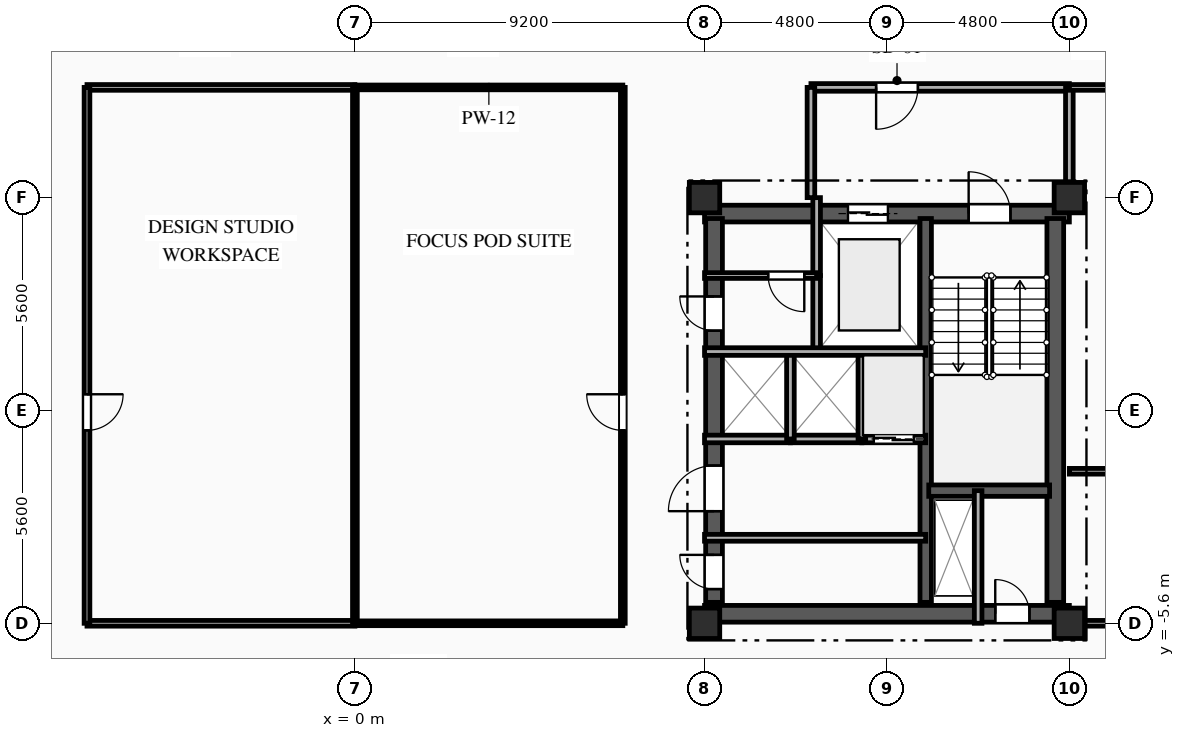
"""IFC4 building model, lengths in metres.
Left out: names, types, materials, properties, quantities, classifications, styles, units other than length and angle.
Written with IfcOpenShell. Run it as: python <this file> out.ifc"""

import sys

from ifc_helpers import new_model, si_unit, direction, frame, frame_2d, origin, origin_2d, place, context, subcontext, project, spatial, rectangle, extrude, element, fill, save


model = new_model("IFC4")
c1 = context("Model", 3, precision=1e-05, world=origin(), true_north=direction((0.0, 1.0)))
c2 = subcontext(c1, "Body", "Model", "MODEL_VIEW")
j1 = project(units=[si_unit("LENGTHUNIT", "METRE"), si_unit("PLANEANGLEUNIT", "RADIAN")], contexts=[c1])
p1 = place(None, origin())
s1 = spatial("IfcSite", under=j1, at=p1, CompositionType="ELEMENT")
p2 = place(p1, origin())
s2 = spatial("IfcBuilding", under=s1, at=p2, CompositionType="ELEMENT")
p3 = place(p2, frame((0.0, 0.0, 238.35)))
s3 = spatial("IfcBuildingStorey", under=s2, at=p3, CompositionType="ELEMENT", Elevation=238.35)
for number, where, z_axis, x_axis in (
    (1, (9.2, -5.6, 0.0), (0.0, 0.0, 1.0), (1.0, 0.0, 0.0)),
    (2, (9.2, 5.6, 0.0), (0.0, 0.0, 1.0), (1.0, 0.0, 0.0)),
    (3, (18.8, -5.6, 0.0), (0.0, 0.0, 1.0), (1.0, 0.0, 0.0)),
    (4, (18.8, 5.6, 0.0), (0.0, 0.0, 1.0), (1.0, 0.0, 0.0)),
):
    element("IfcColumn", number, at=place(p3, frame(where, z_axis=z_axis, x_axis=x_axis)), inside=s3, PredefinedType="COLUMN", context=c2, shape_type="SweptSolid", body=[
        extrude(rectangle(XDim=0.8, YDim=0.8, at=origin_2d()), origin(), (0.0, 0.0, 1.0), 3.35),
    ])
p4 = place(p3, frame((9.2, 5.18, 0.0), z_axis=(0.0, 0.0, 1.0), x_axis=(1.0, 0.0, 0.0)))
e5 = element("IfcWall", 5, at=p4, inside=s3, PredefinedType="SHEAR", context=c2, shape_type="SweptSolid", body=[
    extrude(rectangle(XDim=9.6, YDim=0.44, at=frame_2d((4.8, 0.0))), origin(), (0.0, 0.0, 1.0), 3.04),
])
p5 = place(p4, frame((6.95, 0.0, 0.0)))
e6 = element("IfcOpeningElement", 6, at=p5, cuts=e5, PredefinedType="OPENING", context=c2, shape_type="SweptSolid", body=[
    extrude(rectangle(XDim=1.1, YDim=2.15, at=frame_2d((0.55, 1.075))), frame((0.0, 0.23, 0.0), z_axis=(0.0, -1.0, 0.0), x_axis=(1.0, 0.0, 0.0)), (0.0, 0.0, 1.0), 0.46),
])
p6 = place(p4, frame((3.775, 0.0, 0.0)))
e7 = element("IfcOpeningElement", 7, at=p6, cuts=e5, PredefinedType="OPENING", context=c2, shape_type="SweptSolid", body=[
    extrude(rectangle(XDim=1.05, YDim=2.1, at=frame_2d((0.525, 1.05))), frame((0.0, 0.23, 0.0), z_axis=(0.0, -1.0, 0.0), x_axis=(1.0, 0.0, 0.0)), (0.0, 0.0, 1.0), 0.46),
])
p7 = place(p3, frame((9.2, -5.35, 0.0), z_axis=(0.0, 0.0, 1.0), x_axis=(1.0, 0.0, 0.0)))
e8 = element("IfcWall", 8, at=p7, inside=s3, PredefinedType="SHEAR", context=c2, shape_type="SweptSolid", body=[
    extrude(rectangle(XDim=9.6, YDim=0.44, at=frame_2d((4.8, 0.0))), origin(), (0.0, 0.0, 1.0), 3.04),
])
p8 = place(p7, frame((7.65, 0.0, 0.0)))
e9 = element("IfcOpeningElement", 9, at=p8, cuts=e8, PredefinedType="OPENING", context=c2, shape_type="SweptSolid", body=[
    extrude(rectangle(XDim=0.9, YDim=2.1, at=frame_2d((0.45, 1.05))), frame((0.0, 0.23, 0.0), z_axis=(0.0, -1.0, 0.0), x_axis=(1.0, 0.0, 0.0)), (0.0, 0.0, 1.0), 0.46),
])
p9 = place(p3, frame((9.45, -5.05, 0.0), z_axis=(0.0, 0.0, 1.0), x_axis=(0.0, 1.0, 0.0)))
e10 = element("IfcWall", 10, at=p9, inside=s3, PredefinedType="SHEAR", context=c2, shape_type="SweptSolid", body=[
    extrude(rectangle(XDim=10.1, YDim=0.44, at=frame_2d((5.05, 0.0))), origin(), (0.0, 0.0, 1.0), 3.04),
])
p10 = place(p9, frame((7.15, 0.0, 0.0)))
e11 = element("IfcOpeningElement", 11, at=p10, cuts=e10, PredefinedType="OPENING", context=c2, shape_type="SweptSolid", body=[
    extrude(rectangle(XDim=0.9, YDim=2.1, at=frame_2d((0.45, 1.05))), frame((0.0, 0.23, 0.0), z_axis=(0.0, -1.0, 0.0), x_axis=(1.0, 0.0, 0.0)), (0.0, 0.0, 1.0), 0.46),
])
p11 = place(p9, frame((2.4, 0.0, 0.0)))
e12 = element("IfcOpeningElement", 12, at=p11, cuts=e10, PredefinedType="OPENING", context=c2, shape_type="SweptSolid", body=[
    extrude(rectangle(XDim=1.2, YDim=2.15, at=frame_2d((0.6, 1.075))), frame((0.0, 0.23, 0.0), z_axis=(0.0, -1.0, 0.0), x_axis=(1.0, 0.0, 0.0)), (0.0, 0.0, 1.0), 0.46),
])
p12 = place(p9, frame((0.35, 0.0, 0.0)))
e13 = element("IfcOpeningElement", 13, at=p12, cuts=e10, PredefinedType="OPENING", context=c2, shape_type="SweptSolid", body=[
    extrude(rectangle(XDim=0.9, YDim=2.1, at=frame_2d((0.45, 1.05))), frame((0.0, 0.23, 0.0), z_axis=(0.0, -1.0, 0.0), x_axis=(1.0, 0.0, 0.0)), (0.0, 0.0, 1.0), 0.46),
])
p13 = place(p3, frame((18.43, -5.05, 0.0), z_axis=(0.0, 0.0, 1.0), x_axis=(0.0, 1.0, 0.0)))
e14 = element("IfcWall", 14, at=p13, inside=s3, PredefinedType="SHEAR", context=c2, shape_type="SweptSolid", body=[
    extrude(rectangle(XDim=10.1, YDim=0.44, at=frame_2d((5.05, 0.0))), origin(), (0.0, 0.0, 1.0), 3.04),
])
p14 = place(p3, frame((15.02, -5.05, 0.0), z_axis=(0.0, 0.0, 1.0), x_axis=(0.0, 1.0, 0.0)))
e15 = element("IfcWall", 15, at=p14, inside=s3, PredefinedType="SHEAR", context=c2, shape_type="SweptSolid", body=[
    extrude(rectangle(XDim=10.1, YDim=0.3, at=frame_2d((5.05, 0.0))), origin(), (0.0, 0.0, 1.0), 3.04),
])
p15 = place(p3, frame((15.1, -2.11, 0.0), z_axis=(0.0, 0.0, 1.0), x_axis=(1.0, 0.0, 0.0)))
e16 = element("IfcWall", 16, at=p15, inside=s3, PredefinedType="SHEAR", context=c2, shape_type="SweptSolid", body=[
    extrude(rectangle(XDim=3.18, YDim=0.3, at=frame_2d((1.59, 0.0))), origin(), (0.0, 0.0, 1.0), 3.04),
])
p16 = place(p3, frame((16.4, -2.11, 0.0), z_axis=(0.0, 0.0, 1.0), x_axis=(0.0, -1.0, 0.0)))
e17 = element("IfcWall", 17, at=p16, inside=s3, PredefinedType="PARTITIONING", context=c2, shape_type="SweptSolid", body=[
    extrude(rectangle(XDim=3.49, YDim=0.2, at=frame_2d((1.745, 0.0))), origin(), (0.0, 0.0, 1.0), 3.04),
])
p17 = place(p3, frame((12.15, 3.55, 0.0), z_axis=(0.0, 0.0, 1.0), x_axis=(0.0, -1.0, 0.0)))
e18 = element("IfcWall", 18, at=p17, inside=s3, PredefinedType="PARTITIONING", context=c2, shape_type="SweptSolid", body=[
    extrude(rectangle(XDim=2.0, YDim=0.2, at=frame_2d((1.0, 0.0))), origin(), (0.0, 0.0, 1.0), 3.04),
])
p18 = place(p3, frame((12.15, 5.6, 0.0), z_axis=(0.0, 0.0, 1.0), x_axis=(0.0, -1.0, 0.0)))
e19 = element("IfcWall", 19, at=p18, inside=s3, PredefinedType="PARTITIONING", context=c2, shape_type="SweptSolid", body=[
    extrude(rectangle(XDim=2.05, YDim=0.2, at=frame_2d((1.025, 0.0))), origin(), (0.0, 0.0, 1.0), 3.04),
])
p19 = place(p3, frame((18.8, 8.5, 0.0), z_axis=(0.0, 0.0, 1.0), x_axis=(-1.0, 0.0, 0.0)))
e20 = element("IfcWall", 20, at=p19, inside=s3, PredefinedType="PARTITIONING", context=c2, shape_type="SweptSolid", body=[
    extrude(rectangle(XDim=6.8, YDim=0.2, at=frame_2d((3.4, 0.0))), origin(), (0.0, 0.0, 1.0), 3.04),
])
p20 = place(p19, frame((3.985, 0.0, 0.0)))
e21 = element("IfcOpeningElement", 21, at=p20, cuts=e20, PredefinedType="OPENING", context=c2, shape_type="SweptSolid", body=[
    extrude(rectangle(XDim=1.1, YDim=2.15, at=frame_2d((0.55, 1.075))), frame((0.0, 0.11, 0.0), z_axis=(0.0, -1.0, 0.0), x_axis=(1.0, 0.0, 0.0)), (0.0, 0.0, 1.0), 0.22),
])
p21 = place(p3, frame((12.0, 8.5, 0.0), z_axis=(0.0, 0.0, 1.0), x_axis=(0.0, -1.0, 0.0)))
e22 = element("IfcWall", 22, at=p21, inside=s3, PredefinedType="PARTITIONING", context=c2, shape_type="SweptSolid", body=[
    extrude(rectangle(XDim=2.9, YDim=0.2, at=frame_2d((1.45, 0.0))), origin(), (0.0, 0.0, 1.0), 3.04),
])
p22 = place(p3, frame((18.8, 5.6, 0.0), z_axis=(0.0, 0.0, 1.0), x_axis=(0.0, 1.0, 0.0)))
e23 = element("IfcWall", 23, at=p22, inside=s3, PredefinedType="PARTITIONING", context=c2, shape_type="SweptSolid", body=[
    extrude(rectangle(XDim=2.9, YDim=0.2, at=frame_2d((1.45, 0.0))), origin(), (0.0, 0.0, 1.0), 2.665),
])
p23 = place(p3, frame((12.15, 3.55, 0.0), z_axis=(0.0, 0.0, 1.0), x_axis=(-1.0, 0.0, 0.0)))
e24 = element("IfcWall", 24, at=p23, inside=s3, PredefinedType="PARTITIONING", context=c2, shape_type="SweptSolid", body=[
    extrude(rectangle(XDim=2.95, YDim=0.15, at=frame_2d((1.475, 0.0))), origin(), (0.0, 0.0, 1.0), 3.04),
])
p24 = place(p23, frame((0.325, 0.0, 0.0)))
e25 = element("IfcOpeningElement", 25, at=p24, cuts=e24, PredefinedType="OPENING", context=c2, shape_type="SweptSolid", body=[
    extrude(rectangle(XDim=0.95, YDim=2.1, at=frame_2d((0.475, 1.05))), frame((0.0, 0.085, 0.0), z_axis=(0.0, -1.0, 0.0), x_axis=(1.0, 0.0, 0.0)), (0.0, 0.0, 1.0), 0.17),
])
p25 = place(p3, frame((9.2, -3.35, 0.0), z_axis=(0.0, 0.0, 1.0), x_axis=(1.0, 0.0, 0.0)))
e26 = element("IfcWall", 26, at=p25, inside=s3, PredefinedType="PARTITIONING", context=c2, shape_type="SweptSolid", body=[
    extrude(rectangle(XDim=5.82, YDim=0.18, at=frame_2d((2.91, 0.0))), origin(), (0.0, 0.0, 1.0), 2.755),
])
p26 = place(p3, frame((11.46, -0.75, 0.0), z_axis=(0.0, 0.0, 1.0), x_axis=(-1.0, 0.0, 0.0)))
e27 = element("IfcWall", 27, at=p26, inside=s3, PredefinedType="PARTITIONING", context=c2, shape_type="SweptSolid", body=[
    extrude(rectangle(XDim=2.26, YDim=0.2, at=frame_2d((1.13, 0.0))), origin(), (0.0, 0.0, 1.0), 3.04),
])
p27 = place(p3, frame((13.34, -0.75, 0.0), z_axis=(0.0, 0.0, 1.0), x_axis=(-1.0, 0.0, 0.0)))
e28 = element("IfcWall", 28, at=p27, inside=s3, PredefinedType="PARTITIONING", context=c2, shape_type="SweptSolid", body=[
    extrude(rectangle(XDim=1.88, YDim=0.2, at=frame_2d((0.94, 0.0))), origin(), (0.0, 0.0, 1.0), 3.04),
])
p28 = place(p3, frame((15.02, -0.75, 0.0), z_axis=(0.0, 0.0, 1.0), x_axis=(-1.0, 0.0, 0.0)))
e29 = element("IfcWall", 29, at=p28, inside=s3, PredefinedType="PARTITIONING", context=c2, shape_type="SweptSolid", body=[
    extrude(rectangle(XDim=1.68, YDim=0.2, at=frame_2d((0.84, 0.0))), origin(), (0.0, 0.0, 1.0), 3.04),
])
p29 = place(p28, frame((0.315, 0.0, 0.0)))
e30 = element("IfcOpeningElement", 30, at=p29, cuts=e29, PredefinedType="OPENING", context=c2, shape_type="SweptSolid", body=[
    extrude(rectangle(XDim=1.05, YDim=2.1, at=frame_2d((0.525, 1.05))), frame((0.0, 0.11, 0.0), z_axis=(0.0, -1.0, 0.0), x_axis=(1.0, 0.0, 0.0)), (0.0, 0.0, 1.0), 0.22),
])
for number, where, z_axis, x_axis in (
    (31, (11.46, -0.75, 0.0), (0.0, 0.0, 1.0), (0.0, 1.0, 0.0)),
    (32, (13.34, -0.75, 0.0), (0.0, 0.0, 1.0), (0.0, 1.0, 0.0)),
):
    element("IfcWall", number, at=place(p3, frame(where, z_axis=z_axis, x_axis=x_axis)), inside=s3, PredefinedType="PARTITIONING", context=c2, shape_type="SweptSolid", body=[
        extrude(rectangle(XDim=2.3, YDim=0.2, at=frame_2d((1.15, 0.0))), origin(), (0.0, 0.0, 1.0), 3.04),
    ])
p30 = place(p3, frame((0.0, 8.5, 0.0), z_axis=(0.0, 0.0, 1.0), x_axis=(-1.0, 0.0, 0.0)))
e33 = element("IfcWall", 33, at=p30, inside=s3, PredefinedType="PARTITIONING", context=c2, shape_type="SweptSolid", body=[
    extrude(rectangle(XDim=7.05, YDim=0.15, at=frame_2d((3.525, 0.0))), origin(), (0.0, 0.0, 1.0), 3.04),
])
p31 = place(p3, frame((20.5, 8.5, 0.0), z_axis=(0.0, 0.0, 1.0), x_axis=(-1.0, 0.0, 0.0)))
e34 = element("IfcWall", 34, at=p31, inside=s3, PredefinedType="PARTITIONING", context=c2, shape_type="SweptSolid", body=[
    extrude(rectangle(XDim=1.7, YDim=0.15, at=frame_2d((0.85, 0.0))), origin(), (0.0, 0.0, 1.0), 3.04),
])
p32 = place(p3, frame((7.05, 8.5, 0.0), z_axis=(0.0, 0.0, 1.0), x_axis=(-1.0, 0.0, 0.0)))
e35 = element("IfcWall", 35, at=p32, inside=s3, PredefinedType="PARTITIONING", context=c2, shape_type="SweptSolid", body=[
    extrude(rectangle(XDim=7.05, YDim=0.125, at=frame_2d((3.525, 0.0))), origin(), (0.0, 0.0, 1.0), 3.04),
])
p33 = place(p3, frame((-7.05, -5.6, 0.0), z_axis=(0.0, 0.0, 1.0), x_axis=(1.0, 0.0, 0.0)))
e36 = element("IfcWall", 36, at=p33, inside=s3, PredefinedType="PARTITIONING", context=c2, shape_type="SweptSolid", body=[
    extrude(rectangle(XDim=7.05, YDim=0.15, at=frame_2d((3.525, 0.0))), origin(), (0.0, 0.0, 1.0), 2.525),
])
p34 = place(p3, frame((18.8, -5.6, 0.0), z_axis=(0.0, 0.0, 1.0), x_axis=(1.0, 0.0, 0.0)))
e37 = element("IfcWall", 37, at=p34, inside=s3, PredefinedType="PARTITIONING", context=c2, shape_type="SweptSolid", body=[
    extrude(rectangle(XDim=1.7, YDim=0.15, at=frame_2d((0.85, 0.0))), origin(), (0.0, 0.0, 1.0), 3.04),
])
p35 = place(p3, frame((0.0, -5.6, 0.0), z_axis=(0.0, 0.0, 1.0), x_axis=(1.0, 0.0, 0.0)))
e38 = element("IfcWall", 38, at=p35, inside=s3, PredefinedType="PARTITIONING", context=c2, shape_type="SweptSolid", body=[
    extrude(rectangle(XDim=7.05, YDim=0.125, at=frame_2d((3.525, 0.0))), origin(), (0.0, 0.0, 1.0), 2.525),
])
p36 = place(p3, frame((-7.05, 8.5, 0.0), z_axis=(0.0, 0.0, 1.0), x_axis=(0.0, -1.0, 0.0)))
e39 = element("IfcWall", 39, at=p36, inside=s3, PredefinedType="PARTITIONING", context=c2, shape_type="SweptSolid", body=[
    extrude(rectangle(XDim=14.1, YDim=0.15, at=frame_2d((7.05, 0.0))), origin(), (0.0, 0.0, 1.0), 3.04),
])
p37 = place(p36, frame((8.074, 0.0, 0.0)))
e40 = element("IfcOpeningElement", 40, at=p37, cuts=e39, PredefinedType="OPENING", context=c2, shape_type="SweptSolid", body=[
    extrude(rectangle(XDim=0.95, YDim=2.1, at=frame_2d((0.475, 1.05))), frame((0.0, 0.085, 0.0), z_axis=(0.0, -1.0, 0.0), x_axis=(1.0, 0.0, 0.0)), (0.0, 0.0, 1.0), 0.17),
])
p38 = place(p3, frame((7.05, -5.6, 0.0), z_axis=(0.0, 0.0, 1.0), x_axis=(0.0, 1.0, 0.0)))
e41 = element("IfcWall", 41, at=p38, inside=s3, PredefinedType="PARTITIONING", context=c2, shape_type="SweptSolid", body=[
    extrude(rectangle(XDim=14.1, YDim=0.125, at=frame_2d((7.05, 0.0))), origin(), (0.0, 0.0, 1.0), 3.04),
])
p39 = place(p38, frame((5.076, 0.0, 0.0)))
e42 = element("IfcOpeningElement", 42, at=p39, cuts=e41, PredefinedType="OPENING", context=c2, shape_type="SweptSolid", body=[
    extrude(rectangle(XDim=0.95, YDim=2.1, at=frame_2d((0.475, 1.05))), frame((0.0, 0.073, 0.0), z_axis=(0.0, -1.0, 0.0), x_axis=(1.0, 0.0, 0.0)), (0.0, 0.0, 1.0), 0.145),
])
p40 = place(p3, frame((18.8, -1.6, 0.0), z_axis=(0.0, 0.0, 1.0), x_axis=(1.0, 0.0, 0.0)))
e43 = element("IfcWall", 43, at=p40, inside=s3, PredefinedType="PARTITIONING", context=c2, shape_type="SweptSolid", body=[
    extrude(rectangle(XDim=4.8, YDim=0.15, at=frame_2d((2.4, 0.0))), origin(), (0.0, 0.0, 1.0), 3.04),
])
p41 = place(p3, frame((0.0, 8.5, 0.0), z_axis=(0.0, 0.0, 1.0), x_axis=(0.0, -1.0, 0.0)))
e44 = element("IfcWall", 44, at=p41, inside=s3, PredefinedType="PARTITIONING", context=c2, shape_type="SweptSolid", body=[
    extrude(rectangle(XDim=14.1, YDim=0.125, at=frame_2d((7.05, 0.0))), origin(), (0.0, 0.0, 1.0), 3.04),
])
p42 = place(p3, frame((9.2, 1.55, 0.0), z_axis=(0.0, 0.0, 1.0), x_axis=(1.0, 0.0, 0.0)))
e45 = element("IfcWall", 45, at=p42, inside=s3, PredefinedType="PARTITIONING", context=c2, shape_type="SweptSolid", body=[
    extrude(rectangle(XDim=5.82, YDim=0.2, at=frame_2d((2.91, 0.0))), origin(), (0.0, 0.0, 1.0), 3.04),
])
p43 = place(p5, origin())
e46 = element("IfcDoor", 46, at=p43, inside=s3, OperationType="SINGLE_SWING_LEFT", PredefinedType="DOOR", context=c2, shape_type="SweptSolid", body=[
    extrude(rectangle(XDim=1.1, YDim=2.15, at=frame_2d((0.55, 1.075))), frame((0.0, 0.025, 0.0), z_axis=(0.0, -1.0, 0.0), x_axis=(1.0, 0.0, 0.0)), (0.0, 0.0, 1.0), 0.05),
])
fill(e6, e46)
p44 = place(p6, origin())
e47 = element("IfcDoor", 47, at=p44, inside=s3, OperationType="DOUBLE_DOOR_SLIDING", PredefinedType="DOOR", context=c2, shape_type="SweptSolid", body=[
    extrude(rectangle(XDim=1.05, YDim=2.1, at=frame_2d((0.525, 1.05))), frame((0.0, 0.025, 0.0), z_axis=(0.0, -1.0, 0.0), x_axis=(1.0, 0.0, 0.0)), (0.0, 0.0, 1.0), 0.05),
])
fill(e7, e47)
p45 = place(p8, origin())
e48 = element("IfcDoor", 48, at=p45, inside=s3, OperationType="SINGLE_SWING_LEFT", PredefinedType="DOOR", context=c2, shape_type="SweptSolid", body=[
    extrude(rectangle(XDim=0.9, YDim=2.1, at=frame_2d((0.45, 1.05))), frame((0.0, 0.025, 0.0), z_axis=(0.0, -1.0, 0.0), x_axis=(1.0, 0.0, 0.0)), (0.0, 0.0, 1.0), 0.05),
])
fill(e9, e48)
p46 = place(p20, origin())
e49 = element("IfcDoor", 49, at=p46, inside=s3, OperationType="SINGLE_SWING_RIGHT", PredefinedType="DOOR", context=c2, shape_type="SweptSolid", body=[
    extrude(rectangle(XDim=1.1, YDim=2.15, at=frame_2d((0.55, 1.075))), frame((0.0, 0.025, 0.0), z_axis=(0.0, -1.0, 0.0), x_axis=(1.0, 0.0, 0.0)), (0.0, 0.0, 1.0), 0.05),
])
fill(e21, e49)
p47 = place(p24, origin())
e50 = element("IfcDoor", 50, at=p47, inside=s3, OperationType="SINGLE_SWING_LEFT", PredefinedType="DOOR", context=c2, shape_type="SweptSolid", body=[
    extrude(rectangle(XDim=0.95, YDim=2.1, at=frame_2d((0.475, 1.05))), frame((0.0, 0.025, 0.0), z_axis=(0.0, -1.0, 0.0), x_axis=(1.0, 0.0, 0.0)), (0.0, 0.0, 1.0), 0.05),
])
fill(e25, e50)
p48 = place(p10, origin())
e51 = element("IfcDoor", 51, at=p48, inside=s3, OperationType="SINGLE_SWING_RIGHT", PredefinedType="DOOR", context=c2, shape_type="SweptSolid", body=[
    extrude(rectangle(XDim=0.9, YDim=2.1, at=frame_2d((0.45, 1.05))), frame((0.0, 0.025, 0.0), z_axis=(0.0, -1.0, 0.0), x_axis=(1.0, 0.0, 0.0)), (0.0, 0.0, 1.0), 0.05),
])
fill(e11, e51)
p49 = place(p29, origin())
e52 = element("IfcDoor", 52, at=p49, inside=s3, OperationType="DOUBLE_DOOR_SLIDING", PredefinedType="DOOR", context=c2, shape_type="SweptSolid", body=[
    extrude(rectangle(XDim=1.05, YDim=2.1, at=frame_2d((0.525, 1.05))), frame((0.0, 0.025, 0.0), z_axis=(0.0, -1.0, 0.0), x_axis=(1.0, 0.0, 0.0)), (0.0, 0.0, 1.0), 0.05),
])
fill(e30, e52)
p50 = place(p11, origin())
e53 = element("IfcDoor", 53, at=p50, inside=s3, OperationType="SINGLE_SWING_LEFT", PredefinedType="DOOR", context=c2, shape_type="SweptSolid", body=[
    extrude(rectangle(XDim=1.2, YDim=2.15, at=frame_2d((0.6, 1.075))), frame((0.0, 0.025, 0.0), z_axis=(0.0, -1.0, 0.0), x_axis=(1.0, 0.0, 0.0)), (0.0, 0.0, 1.0), 0.05),
])
fill(e12, e53)
p51 = place(p12, origin())
e54 = element("IfcDoor", 54, at=p51, inside=s3, OperationType="SINGLE_SWING_RIGHT", PredefinedType="DOOR", context=c2, shape_type="SweptSolid", body=[
    extrude(rectangle(XDim=0.9, YDim=2.1, at=frame_2d((0.45, 1.05))), frame((0.0, 0.025, 0.0), z_axis=(0.0, -1.0, 0.0), x_axis=(1.0, 0.0, 0.0)), (0.0, 0.0, 1.0), 0.05),
])
fill(e13, e54)
p52 = place(p37, origin())
e55 = element("IfcDoor", 55, at=p52, inside=s3, OperationType="SINGLE_SWING_LEFT", PredefinedType="DOOR", context=c2, shape_type="SweptSolid", body=[
    extrude(rectangle(XDim=0.95, YDim=2.1, at=frame_2d((0.475, 1.05))), frame((0.0, 0.025, 0.0), z_axis=(0.0, -1.0, 0.0), x_axis=(1.0, 0.0, 0.0)), (0.0, 0.0, 1.0), 0.05),
])
fill(e40, e55)
p53 = place(p39, origin())
e56 = element("IfcDoor", 56, at=p53, inside=s3, OperationType="SINGLE_SWING_RIGHT", PredefinedType="DOOR", context=c2, shape_type="SweptSolid", body=[
    extrude(rectangle(XDim=0.95, YDim=2.1, at=frame_2d((0.475, 1.05))), frame((0.0, 0.025, 0.0), z_axis=(0.0, -1.0, 0.0), x_axis=(1.0, 0.0, 0.0)), (0.0, 0.0, 1.0), 0.05),
])
fill(e42, e56)
save(model, sys.argv[1])
